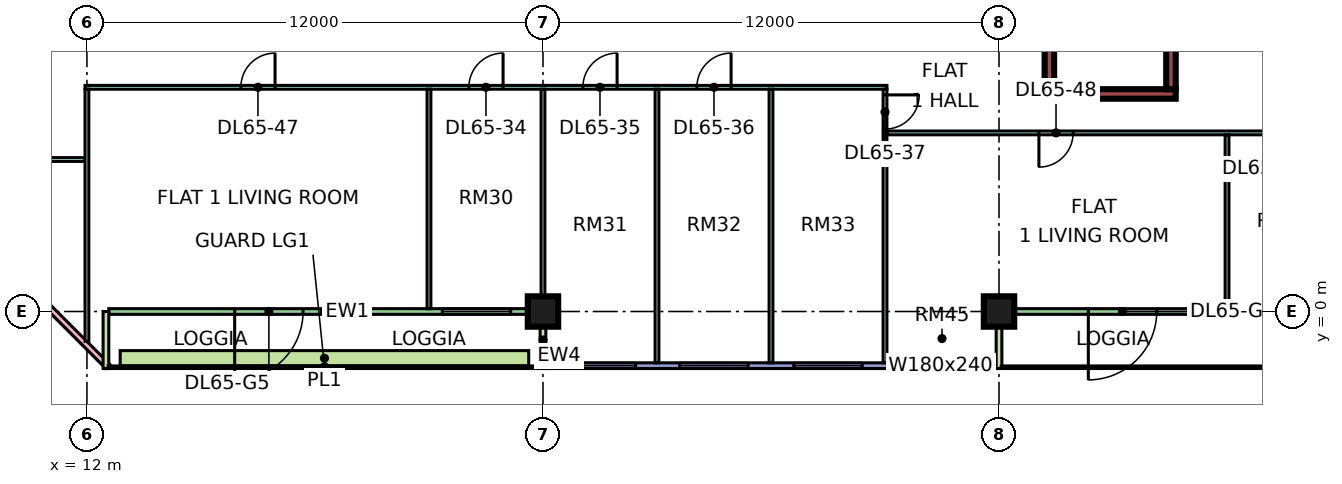
"""IFC4 building model, lengths in metres.
Left out: names, types, materials, properties, quantities, classifications, styles, units other than length and angle.
Written with IfcOpenShell. Run it as: python <this file> out.ifc"""

import sys

from ifc_helpers import new_model, si_unit, direction, frame, frame_2d, origin, origin_2d, place, context, subcontext, project, spatial, rectangle, extrude, element, fill, save


model = new_model("IFC4")
c1 = context("Model", 3, precision=1e-05, world=origin(), true_north=direction((0.0, 1.0)))
c2 = subcontext(c1, "Body", "Model", "MODEL_VIEW")
j1 = project(units=[si_unit("LENGTHUNIT", "METRE"), si_unit("PLANEANGLEUNIT", "RADIAN")], contexts=[c1])
p1 = place(None, origin())
s1 = spatial("IfcSite", under=j1, at=p1, CompositionType="ELEMENT")
p2 = place(p1, origin())
s2 = spatial("IfcBuilding", under=s1, at=p2, CompositionType="ELEMENT")
p3 = place(p2, frame((0.0, 0.0, 280.9)))
s3 = spatial("IfcBuildingStorey", under=s2, at=p3, CompositionType="ELEMENT", Elevation=280.9)
for number, where, z_axis, x_axis in (
    (1, (24.0, 0.0, 0.0), (0.0, 0.0, 1.0), (1.0, 0.0, 0.0)),
    (2, (36.0, 0.0, 0.0), (0.0, 0.0, 1.0), (1.0, 0.0, 0.0)),
):
    element("IfcColumn", number, at=place(p3, frame(where, z_axis=z_axis, x_axis=x_axis)), inside=s3, PredefinedType="COLUMN", context=c2, shape_type="SweptSolid", body=[
        extrude(rectangle(XDim=0.8, YDim=0.8, at=origin_2d()), origin(), (0.0, 0.0, 1.0), 3.75),
    ])
p4 = place(p3, frame((37.2, 5.725, 0.0), z_axis=(0.0, 0.0, 1.0), x_axis=(1.0, 0.0, 0.0)))
e3 = element("IfcWall", 3, at=p4, inside=s3, PredefinedType="SHEAR", context=c2, shape_type="SweptSolid", body=[
    extrude(rectangle(XDim=3.45, YDim=0.25, at=frame_2d((1.725, 0.0))), origin(), (0.0, 0.0, 1.0), 3.75),
])
for number, where, z_axis, x_axis in (
    (4, (37.325, 5.85, 0.0), (0.0, 0.0, 1.0), (0.0, 1.0, 0.0)),
    (5, (40.525, 5.85, 0.0), (0.0, 0.0, 1.0), (0.0, 1.0, 0.0)),
):
    element("IfcWall", number, at=place(p3, frame(where, z_axis=z_axis, x_axis=x_axis)), inside=s3, PredefinedType="SHEAR", context=c2, shape_type="SweptSolid", body=[
        extrude(rectangle(XDim=6.5, YDim=0.25, at=frame_2d((3.25, 0.0))), origin(), (0.0, 0.0, 1.0), 3.75),
    ])
p5 = place(p3, frame((-1.447, 12.553, 0.0), z_axis=(0.0, 0.0, 1.0), x_axis=(0.707106781187, -0.707106781187, 0.0)))
e6 = element("IfcWall", 6, at=p5, inside=s3, PredefinedType="SOLIDWALL", context=c2, shape_type="SweptSolid", body=[
    extrude(rectangle(XDim=19.799, YDim=0.15, at=frame_2d((9.899, 0.0))), origin(), (0.0, 0.0, 1.0), 3.35),
])
p6 = place(p5, frame((2.212, 0.0, 0.45)))
e7 = element("IfcOpeningElement", 7, at=p6, cuts=e6, PredefinedType="OPENING", context=c2, shape_type="SweptSolid", body=[
    extrude(rectangle(XDim=3.0, YDim=2.4, at=frame_2d((1.5, 1.2))), frame((0.0, 0.085, 0.0), z_axis=(0.0, -1.0, 0.0), x_axis=(1.0, 0.0, 0.0)), (0.0, 0.0, 1.0), 0.17),
])
p7 = place(p5, frame((10.216, 0.0, 0.45)))
e8 = element("IfcOpeningElement", 8, at=p7, cuts=e6, PredefinedType="OPENING", context=c2, shape_type="SweptSolid", body=[
    extrude(rectangle(XDim=3.0, YDim=2.4, at=frame_2d((1.5, 1.2))), frame((0.0, 0.085, 0.0), z_axis=(0.0, -1.0, 0.0), x_axis=(1.0, 0.0, 0.0)), (0.0, 0.0, 1.0), 0.17),
])
p8 = place(p3, frame((12.575, 0.0, 0.0), z_axis=(0.0, 0.0, 1.0), x_axis=(1.0, 0.0, 0.0)))
e9 = element("IfcWall", 9, at=p8, inside=s3, PredefinedType="SOLIDWALL", context=c2, shape_type="SweptSolid", body=[
    extrude(rectangle(XDim=11.35, YDim=0.15, at=frame_2d((5.675, 0.0))), origin(), (0.0, 0.0, 1.0), 3.35),
])
p9 = place(p8, frame((3.312, 0.0, 0.0)))
e10 = element("IfcOpeningElement", 10, at=p9, cuts=e9, PredefinedType="OPENING", context=c2, shape_type="SweptSolid", body=[
    extrude(rectangle(XDim=1.8, YDim=2.4, at=frame_2d((0.9, 1.2))), frame((0.0, 0.085, 0.0), z_axis=(0.0, -1.0, 0.0), x_axis=(1.0, 0.0, 0.0)), (0.0, 0.0, 1.0), 0.17),
])
p10 = place(p8, frame((8.775, 0.0, 0.45)))
e11 = element("IfcOpeningElement", 11, at=p10, cuts=e9, PredefinedType="OPENING", context=c2, shape_type="SweptSolid", body=[
    extrude(rectangle(XDim=1.8, YDim=2.4, at=frame_2d((0.9, 1.2))), frame((0.0, 0.085, 0.0), z_axis=(0.0, -1.0, 0.0), x_axis=(1.0, 0.0, 0.0)), (0.0, 0.0, 1.0), 0.17),
])
for number, where, z_axis, x_axis in (
    (12, (12.5, -1.5, 0.0), (0.0, 0.0, 1.0), (0.0, 1.0, 0.0)),
    (13, (24.0, -1.5, 0.0), (0.0, 0.0, 1.0), (0.0, 1.0, 0.0)),
):
    element("IfcWall", number, at=place(p3, frame(where, z_axis=z_axis, x_axis=x_axis)), inside=s3, PredefinedType="SOLIDWALL", context=c2, shape_type="SweptSolid", body=[
        extrude(rectangle(XDim=1.5, YDim=0.15, at=frame_2d((0.75, 0.0))), origin(), (0.0, 0.0, 1.0), 3.35),
    ])
p11 = place(p3, frame((24.075, -1.425, 0.0), z_axis=(0.0, 0.0, 1.0), x_axis=(1.0, 0.0, 0.0)))
e14 = element("IfcWall", 14, at=p11, inside=s3, PredefinedType="SOLIDWALL", context=c2, shape_type="SweptSolid", body=[
    extrude(rectangle(XDim=11.85, YDim=0.15, at=frame_2d((5.925, 0.0))), origin(), (0.0, 0.0, 1.0), 3.35),
])
p12 = place(p11, frame((0.562, 0.0, 0.45)))
e15 = element("IfcOpeningElement", 15, at=p12, cuts=e14, PredefinedType="OPENING", context=c2, shape_type="SweptSolid", body=[
    extrude(rectangle(XDim=1.8, YDim=2.4, at=frame_2d((0.9, 1.2))), frame((0.0, 0.085, 0.0), z_axis=(0.0, -1.0, 0.0), x_axis=(1.0, 0.0, 0.0)), (0.0, 0.0, 1.0), 0.17),
])
p13 = place(p11, frame((3.525, 0.0, 0.45)))
e16 = element("IfcOpeningElement", 16, at=p13, cuts=e14, PredefinedType="OPENING", context=c2, shape_type="SweptSolid", body=[
    extrude(rectangle(XDim=1.8, YDim=2.4, at=frame_2d((0.9, 1.2))), frame((0.0, 0.085, 0.0), z_axis=(0.0, -1.0, 0.0), x_axis=(1.0, 0.0, 0.0)), (0.0, 0.0, 1.0), 0.17),
])
p14 = place(p11, frame((6.525, 0.0, 0.45)))
e17 = element("IfcOpeningElement", 17, at=p14, cuts=e14, PredefinedType="OPENING", context=c2, shape_type="SweptSolid", body=[
    extrude(rectangle(XDim=1.8, YDim=2.4, at=frame_2d((0.9, 1.2))), frame((0.0, 0.085, 0.0), z_axis=(0.0, -1.0, 0.0), x_axis=(1.0, 0.0, 0.0)), (0.0, 0.0, 1.0), 0.17),
])
p15 = place(p11, frame((9.488, 0.0, 0.45)))
e18 = element("IfcOpeningElement", 18, at=p15, cuts=e14, PredefinedType="OPENING", context=c2, shape_type="SweptSolid", body=[
    extrude(rectangle(XDim=1.8, YDim=2.4, at=frame_2d((0.9, 1.2))), frame((0.0, 0.085, 0.0), z_axis=(0.0, -1.0, 0.0), x_axis=(1.0, 0.0, 0.0)), (0.0, 0.0, 1.0), 0.17),
])
p16 = place(p3, frame((36.075, 0.0, 0.0), z_axis=(0.0, 0.0, 1.0), x_axis=(1.0, 0.0, 0.0)))
e19 = element("IfcWall", 19, at=p16, inside=s3, PredefinedType="SOLIDWALL", context=c2, shape_type="SweptSolid", body=[
    extrude(rectangle(XDim=11.85, YDim=0.15, at=frame_2d((5.925, 0.0))), origin(), (0.0, 0.0, 1.0), 3.35),
])
p17 = place(p16, frame((2.275, 0.0, 0.0)))
e20 = element("IfcOpeningElement", 20, at=p17, cuts=e19, PredefinedType="OPENING", context=c2, shape_type="SweptSolid", body=[
    extrude(rectangle(XDim=1.8, YDim=2.4, at=frame_2d((0.9, 1.2))), frame((0.0, 0.085, 0.0), z_axis=(0.0, -1.0, 0.0), x_axis=(1.0, 0.0, 0.0)), (0.0, 0.0, 1.0), 0.17),
])
p18 = place(p16, frame((6.275, 0.0, 0.45)))
e21 = element("IfcOpeningElement", 21, at=p18, cuts=e19, PredefinedType="OPENING", context=c2, shape_type="SweptSolid", body=[
    extrude(rectangle(XDim=1.8, YDim=2.4, at=frame_2d((0.9, 1.2))), frame((0.0, 0.085, 0.0), z_axis=(0.0, -1.0, 0.0), x_axis=(1.0, 0.0, 0.0)), (0.0, 0.0, 1.0), 0.17),
])
p19 = place(p16, frame((10.038, 0.0, 0.45)))
e22 = element("IfcOpeningElement", 22, at=p19, cuts=e19, PredefinedType="OPENING", context=c2, shape_type="SweptSolid", body=[
    extrude(rectangle(XDim=1.2, YDim=2.4, at=frame_2d((0.6, 1.2))), frame((0.0, 0.085, 0.0), z_axis=(0.0, -1.0, 0.0), x_axis=(1.0, 0.0, 0.0)), (0.0, 0.0, 1.0), 0.17),
])
p20 = place(p3, frame((36.0, -1.5, 0.0), z_axis=(0.0, 0.0, 1.0), x_axis=(0.0, 1.0, 0.0)))
e23 = element("IfcWall", 23, at=p20, inside=s3, PredefinedType="SOLIDWALL", context=c2, shape_type="SweptSolid", body=[
    extrude(rectangle(XDim=1.5, YDim=0.15, at=frame_2d((0.75, 0.0))), origin(), (0.0, 0.0, 1.0), 3.35),
])
p21 = place(p3, frame((12.875, -1.229, 0.0), z_axis=(0.0, 0.0, 1.0), x_axis=(1.0, 0.0, 0.0)))
e24 = element("IfcWall", 24, at=p21, inside=s3, PredefinedType="SOLIDWALL", context=c2, shape_type="SweptSolid", body=[
    extrude(rectangle(XDim=10.75, YDim=0.4, at=frame_2d((5.375, 0.0))), origin(), (0.0, 0.0, 1.0), 0.7),
])
p22 = place(p3, frame((9.05, 4.0, 0.0), z_axis=(0.0, 0.0, 1.0), x_axis=(1.0, 0.0, 0.0)))
e25 = element("IfcWall", 25, at=p22, inside=s3, PredefinedType="PARTITIONING", context=c2, shape_type="SweptSolid", body=[
    extrude(rectangle(XDim=2.9, YDim=0.1, at=frame_2d((1.45, 0.0))), origin(), (0.0, 0.0, 1.0), 3.35),
])
p23 = place(p3, frame((11.95, 5.9, 0.0), z_axis=(0.0, 0.0, 1.0), x_axis=(1.0, 0.0, 0.0)))
e26 = element("IfcWall", 26, at=p23, inside=s3, PredefinedType="PARTITIONING", context=c2, shape_type="SweptSolid", body=[
    extrude(rectangle(XDim=21.1, YDim=0.1, at=frame_2d((10.55, 0.0))), origin(), (0.0, 0.0, 1.0), 3.35),
])
p24 = place(p23, frame((10.1, 0.0, 0.0)))
e27 = element("IfcOpeningElement", 27, at=p24, cuts=e26, PredefinedType="OPENING", context=c2, shape_type="SweptSolid", body=[
    extrude(rectangle(XDim=0.9, YDim=2.1, at=frame_2d((0.45, 1.05))), frame((0.0, 0.06, 0.0), z_axis=(0.0, -1.0, 0.0), x_axis=(1.0, 0.0, 0.0)), (0.0, 0.0, 1.0), 0.12),
])
p25 = place(p23, frame((13.1, 0.0, 0.0)))
e28 = element("IfcOpeningElement", 28, at=p25, cuts=e26, PredefinedType="OPENING", context=c2, shape_type="SweptSolid", body=[
    extrude(rectangle(XDim=0.9, YDim=2.1, at=frame_2d((0.45, 1.05))), frame((0.0, 0.06, 0.0), z_axis=(0.0, -1.0, 0.0), x_axis=(1.0, 0.0, 0.0)), (0.0, 0.0, 1.0), 0.12),
])
p26 = place(p23, frame((16.1, 0.0, 0.0)))
e29 = element("IfcOpeningElement", 29, at=p26, cuts=e26, PredefinedType="OPENING", context=c2, shape_type="SweptSolid", body=[
    extrude(rectangle(XDim=0.9, YDim=2.1, at=frame_2d((0.45, 1.05))), frame((0.0, 0.06, 0.0), z_axis=(0.0, -1.0, 0.0), x_axis=(1.0, 0.0, 0.0)), (0.0, 0.0, 1.0), 0.12),
])
p27 = place(p23, frame((4.1, 0.0, 0.0)))
e30 = element("IfcOpeningElement", 30, at=p27, cuts=e26, PredefinedType="OPENING", context=c2, shape_type="SweptSolid", body=[
    extrude(rectangle(XDim=0.9, YDim=2.1, at=frame_2d((0.45, 1.05))), frame((0.0, 0.06, 0.0), z_axis=(0.0, -1.0, 0.0), x_axis=(1.0, 0.0, 0.0)), (0.0, 0.0, 1.0), 0.12),
])
p28 = place(p3, frame((12.0, -0.788, 0.0), z_axis=(0.0, 0.0, 1.0), x_axis=(0.0, 1.0, 0.0)))
e31 = element("IfcWall", 31, at=p28, inside=s3, PredefinedType="PARTITIONING", context=c2, shape_type="SweptSolid", body=[
    extrude(rectangle(XDim=6.638, YDim=0.1, at=frame_2d((3.319, 0.0))), origin(), (0.0, 0.0, 1.0), 3.35),
])
p29 = place(p3, frame((21.0, 0.074, 0.0), z_axis=(0.0, 0.0, 1.0), x_axis=(0.0, 1.0, 0.0)))
e32 = element("IfcWall", 32, at=p29, inside=s3, PredefinedType="PARTITIONING", context=c2, shape_type="SweptSolid", body=[
    extrude(rectangle(XDim=5.776, YDim=0.1, at=frame_2d((2.888, 0.0))), origin(), (0.0, 0.0, 1.0), 3.35),
])
p30 = place(p3, frame((24.0, 0.0, 0.0), z_axis=(0.0, 0.0, 1.0), x_axis=(0.0, 1.0, 0.0)))
e33 = element("IfcWall", 33, at=p30, inside=s3, PredefinedType="PARTITIONING", context=c2, shape_type="SweptSolid", body=[
    extrude(rectangle(XDim=5.85, YDim=0.1, at=frame_2d((2.925, 0.0))), origin(), (0.0, 0.0, 1.0), 3.35),
])
for number, where, z_axis, x_axis in (
    (34, (27.0, -1.351, 0.0), (0.0, 0.0, 1.0), (0.0, 1.0, 0.0)),
    (35, (30.0, -1.351, 0.0), (0.0, 0.0, 1.0), (0.0, 1.0, 0.0)),
):
    element("IfcWall", number, at=place(p3, frame(where, z_axis=z_axis, x_axis=x_axis)), inside=s3, PredefinedType="PARTITIONING", context=c2, shape_type="SweptSolid", body=[
        extrude(rectangle(XDim=7.201, YDim=0.1, at=frame_2d((3.601, 0.0))), origin(), (0.0, 0.0, 1.0), 3.35),
    ])
p31 = place(p3, frame((33.0, -1.35, 0.0), z_axis=(0.0, 0.0, 1.0), x_axis=(0.0, 1.0, 0.0)))
e36 = element("IfcWall", 36, at=p31, inside=s3, PredefinedType="PARTITIONING", context=c2, shape_type="SweptSolid", body=[
    extrude(rectangle(XDim=7.2, YDim=0.1, at=frame_2d((3.6, 0.0))), origin(), (0.0, 0.0, 1.0), 3.35),
])
p32 = place(p31, frame((6.15, 0.0, 0.0)))
e37 = element("IfcOpeningElement", 37, at=p32, cuts=e36, PredefinedType="OPENING", context=c2, shape_type="SweptSolid", body=[
    extrude(rectangle(XDim=0.9, YDim=2.1, at=frame_2d((0.45, 1.05))), frame((0.0, 0.06, 0.0), z_axis=(0.0, -1.0, 0.0), x_axis=(1.0, 0.0, 0.0)), (0.0, 0.0, 1.0), 0.12),
])
p33 = place(p3, frame((33.05, 4.7, 0.0), z_axis=(0.0, 0.0, 1.0), x_axis=(1.0, 0.0, 0.0)))
e38 = element("IfcWall", 38, at=p33, inside=s3, PredefinedType="PARTITIONING", context=c2, shape_type="SweptSolid", body=[
    extrude(rectangle(XDim=20.85, YDim=0.1, at=frame_2d((10.425, 0.0))), origin(), (0.0, 0.0, 1.0), 3.35),
])
p34 = place(p33, frame((10.0, 0.0, 0.0)))
e39 = element("IfcOpeningElement", 39, at=p34, cuts=e38, PredefinedType="OPENING", context=c2, shape_type="SweptSolid", body=[
    extrude(rectangle(XDim=0.9, YDim=2.1, at=frame_2d((0.45, 1.05))), frame((0.0, 0.06, 0.0), z_axis=(0.0, -1.0, 0.0), x_axis=(1.0, 0.0, 0.0)), (0.0, 0.0, 1.0), 0.12),
])
p35 = place(p33, frame((13.0, 0.0, 0.0)))
e40 = element("IfcOpeningElement", 40, at=p35, cuts=e38, PredefinedType="OPENING", context=c2, shape_type="SweptSolid", body=[
    extrude(rectangle(XDim=0.9, YDim=2.1, at=frame_2d((0.45, 1.05))), frame((0.0, 0.06, 0.0), z_axis=(0.0, -1.0, 0.0), x_axis=(1.0, 0.0, 0.0)), (0.0, 0.0, 1.0), 0.12),
])
p36 = place(p33, frame((16.0, 0.0, 0.0)))
e41 = element("IfcOpeningElement", 41, at=p36, cuts=e38, PredefinedType="OPENING", context=c2, shape_type="SweptSolid", body=[
    extrude(rectangle(XDim=0.9, YDim=2.1, at=frame_2d((0.45, 1.05))), frame((0.0, 0.06, 0.0), z_axis=(0.0, -1.0, 0.0), x_axis=(1.0, 0.0, 0.0)), (0.0, 0.0, 1.0), 0.12),
])
p37 = place(p33, frame((19.0, 0.0, 0.0)))
e42 = element("IfcOpeningElement", 42, at=p37, cuts=e38, PredefinedType="OPENING", context=c2, shape_type="SweptSolid", body=[
    extrude(rectangle(XDim=0.9, YDim=2.1, at=frame_2d((0.45, 1.05))), frame((0.0, 0.06, 0.0), z_axis=(0.0, -1.0, 0.0), x_axis=(1.0, 0.0, 0.0)), (0.0, 0.0, 1.0), 0.12),
])
p38 = place(p33, frame((4.0, 0.0, 0.0)))
e43 = element("IfcOpeningElement", 43, at=p38, cuts=e38, PredefinedType="OPENING", context=c2, shape_type="SweptSolid", body=[
    extrude(rectangle(XDim=0.9, YDim=2.1, at=frame_2d((0.45, 1.05))), frame((0.0, 0.06, 0.0), z_axis=(0.0, -1.0, 0.0), x_axis=(1.0, 0.0, 0.0)), (0.0, 0.0, 1.0), 0.12),
])
p39 = place(p3, frame((42.0, 0.074, 0.0), z_axis=(0.0, 0.0, 1.0), x_axis=(0.0, 1.0, 0.0)))
e44 = element("IfcWall", 44, at=p39, inside=s3, PredefinedType="PARTITIONING", context=c2, shape_type="SweptSolid", body=[
    extrude(rectangle(XDim=4.576, YDim=0.1, at=frame_2d((2.288, 0.0))), origin(), (0.0, 0.0, 1.0), 3.35),
])
p40 = place(p9, frame((1.8, 0.0, 0.0), z_axis=(0.0, 0.0, 1.0), x_axis=(-1.0, 0.0, 0.0)))
e45 = element("IfcDoor", 45, at=p40, inside=s3, OperationType="DOUBLE_DOOR_SINGLE_SWING", PredefinedType="DOOR", context=c2, shape_type="SweptSolid", body=[
    extrude(rectangle(XDim=1.8, YDim=2.4, at=frame_2d((0.9, 1.2))), frame((0.0, 0.025, 0.0), z_axis=(0.0, -1.0, 0.0), x_axis=(1.0, 0.0, 0.0)), (0.0, 0.0, 1.0), 0.05),
])
fill(e10, e45)
p41 = place(p10, origin())
e46 = element("IfcWindow", 46, at=p41, inside=s3, PartitioningType="SINGLE_PANEL", PredefinedType="WINDOW", context=c2, shape_type="SweptSolid", body=[
    extrude(rectangle(XDim=1.8, YDim=2.4, at=frame_2d((0.9, 1.2))), frame((0.0, 0.03, 0.0), z_axis=(0.0, -1.0, 0.0), x_axis=(1.0, 0.0, 0.0)), (0.0, 0.0, 1.0), 0.06),
])
fill(e11, e46)
p42 = place(p12, origin())
e47 = element("IfcWindow", 47, at=p42, inside=s3, PartitioningType="SINGLE_PANEL", PredefinedType="WINDOW", context=c2, shape_type="SweptSolid", body=[
    extrude(rectangle(XDim=1.8, YDim=2.4, at=frame_2d((0.9, 1.2))), frame((0.0, 0.03, 0.0), z_axis=(0.0, -1.0, 0.0), x_axis=(1.0, 0.0, 0.0)), (0.0, 0.0, 1.0), 0.06),
])
fill(e15, e47)
p43 = place(p13, origin())
e48 = element("IfcWindow", 48, at=p43, inside=s3, PartitioningType="SINGLE_PANEL", PredefinedType="WINDOW", context=c2, shape_type="SweptSolid", body=[
    extrude(rectangle(XDim=1.8, YDim=2.4, at=frame_2d((0.9, 1.2))), frame((0.0, 0.03, 0.0), z_axis=(0.0, -1.0, 0.0), x_axis=(1.0, 0.0, 0.0)), (0.0, 0.0, 1.0), 0.06),
])
fill(e16, e48)
p44 = place(p14, origin())
e49 = element("IfcWindow", 49, at=p44, inside=s3, PartitioningType="SINGLE_PANEL", PredefinedType="WINDOW", context=c2, shape_type="SweptSolid", body=[
    extrude(rectangle(XDim=1.8, YDim=2.4, at=frame_2d((0.9, 1.2))), frame((0.0, 0.03, 0.0), z_axis=(0.0, -1.0, 0.0), x_axis=(1.0, 0.0, 0.0)), (0.0, 0.0, 1.0), 0.06),
])
fill(e17, e49)
p45 = place(p15, origin())
e50 = element("IfcWindow", 50, at=p45, inside=s3, PartitioningType="SINGLE_PANEL", PredefinedType="WINDOW", context=c2, shape_type="SweptSolid", body=[
    extrude(rectangle(XDim=1.8, YDim=2.4, at=frame_2d((0.9, 1.2))), frame((0.0, 0.03, 0.0), z_axis=(0.0, -1.0, 0.0), x_axis=(1.0, 0.0, 0.0)), (0.0, 0.0, 1.0), 0.06),
])
fill(e18, e50)
p46 = place(p17, frame((1.8, 0.0, 0.0), z_axis=(0.0, 0.0, 1.0), x_axis=(-1.0, 0.0, 0.0)))
e51 = element("IfcDoor", 51, at=p46, inside=s3, OperationType="DOUBLE_DOOR_SINGLE_SWING", PredefinedType="DOOR", context=c2, shape_type="SweptSolid", body=[
    extrude(rectangle(XDim=1.8, YDim=2.4, at=frame_2d((0.9, 1.2))), frame((0.0, 0.025, 0.0), z_axis=(0.0, -1.0, 0.0), x_axis=(1.0, 0.0, 0.0)), (0.0, 0.0, 1.0), 0.05),
])
fill(e20, e51)
p47 = place(p18, origin())
e52 = element("IfcWindow", 52, at=p47, inside=s3, PartitioningType="SINGLE_PANEL", PredefinedType="WINDOW", context=c2, shape_type="SweptSolid", body=[
    extrude(rectangle(XDim=1.8, YDim=2.4, at=frame_2d((0.9, 1.2))), frame((0.0, 0.03, 0.0), z_axis=(0.0, -1.0, 0.0), x_axis=(1.0, 0.0, 0.0)), (0.0, 0.0, 1.0), 0.06),
])
fill(e21, e52)
p48 = place(p24, frame((0.9, 0.0, 0.0), z_axis=(0.0, 0.0, 1.0), x_axis=(-1.0, 0.0, 0.0)))
e53 = element("IfcDoor", 53, at=p48, inside=s3, OperationType="SINGLE_SWING_RIGHT", PredefinedType="DOOR", context=c2, shape_type="SweptSolid", body=[
    extrude(rectangle(XDim=0.9, YDim=2.1, at=frame_2d((0.45, 1.05))), frame((0.0, 0.025, 0.0), z_axis=(0.0, -1.0, 0.0), x_axis=(1.0, 0.0, 0.0)), (0.0, 0.0, 1.0), 0.05),
])
fill(e27, e53)
p49 = place(p25, frame((0.9, 0.0, 0.0), z_axis=(0.0, 0.0, 1.0), x_axis=(-1.0, 0.0, 0.0)))
e54 = element("IfcDoor", 54, at=p49, inside=s3, OperationType="SINGLE_SWING_RIGHT", PredefinedType="DOOR", context=c2, shape_type="SweptSolid", body=[
    extrude(rectangle(XDim=0.9, YDim=2.1, at=frame_2d((0.45, 1.05))), frame((0.0, 0.025, 0.0), z_axis=(0.0, -1.0, 0.0), x_axis=(1.0, 0.0, 0.0)), (0.0, 0.0, 1.0), 0.05),
])
fill(e28, e54)
p50 = place(p26, frame((0.9, 0.0, 0.0), z_axis=(0.0, 0.0, 1.0), x_axis=(-1.0, 0.0, 0.0)))
e55 = element("IfcDoor", 55, at=p50, inside=s3, OperationType="SINGLE_SWING_RIGHT", PredefinedType="DOOR", context=c2, shape_type="SweptSolid", body=[
    extrude(rectangle(XDim=0.9, YDim=2.1, at=frame_2d((0.45, 1.05))), frame((0.0, 0.025, 0.0), z_axis=(0.0, -1.0, 0.0), x_axis=(1.0, 0.0, 0.0)), (0.0, 0.0, 1.0), 0.05),
])
fill(e29, e55)
p51 = place(p32, origin())
e56 = element("IfcDoor", 56, at=p51, inside=s3, OperationType="SINGLE_SWING_RIGHT", PredefinedType="DOOR", context=c2, shape_type="SweptSolid", body=[
    extrude(rectangle(XDim=0.9, YDim=2.1, at=frame_2d((0.45, 1.05))), frame((0.0, 0.025, 0.0), z_axis=(0.0, -1.0, 0.0), x_axis=(1.0, 0.0, 0.0)), (0.0, 0.0, 1.0), 0.05),
])
fill(e37, e56)
p52 = place(p27, frame((0.9, 0.0, 0.0), z_axis=(0.0, 0.0, 1.0), x_axis=(-1.0, 0.0, 0.0)))
e57 = element("IfcDoor", 57, at=p52, inside=s3, OperationType="SINGLE_SWING_RIGHT", PredefinedType="DOOR", context=c2, shape_type="SweptSolid", body=[
    extrude(rectangle(XDim=0.9, YDim=2.1, at=frame_2d((0.45, 1.05))), frame((0.0, 0.025, 0.0), z_axis=(0.0, -1.0, 0.0), x_axis=(1.0, 0.0, 0.0)), (0.0, 0.0, 1.0), 0.05),
])
fill(e30, e57)
p53 = place(p38, frame((0.9, 0.0, 0.0), z_axis=(0.0, 0.0, 1.0), x_axis=(-1.0, 0.0, 0.0)))
e58 = element("IfcDoor", 58, at=p53, inside=s3, OperationType="SINGLE_SWING_LEFT", PredefinedType="DOOR", context=c2, shape_type="SweptSolid", body=[
    extrude(rectangle(XDim=0.9, YDim=2.1, at=frame_2d((0.45, 1.05))), frame((0.0, 0.025, 0.0), z_axis=(0.0, -1.0, 0.0), x_axis=(1.0, 0.0, 0.0)), (0.0, 0.0, 1.0), 0.05),
])
fill(e43, e58)
save(model, sys.argv[1])
